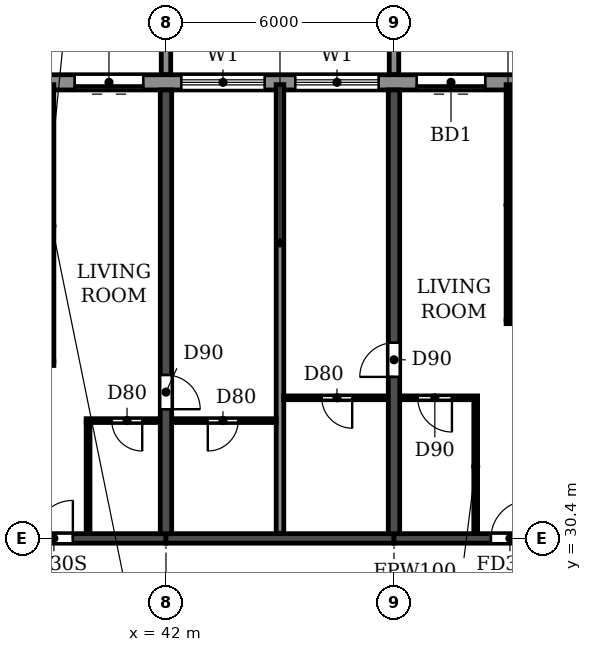
"""IFC4 building model, lengths in metres.
Left out: names, types, materials, properties, quantities, classifications, styles, units other than length and angle.
Written with IfcOpenShell. Run it as: python <this file> out.ifc"""

import sys

from ifc_helpers import new_model, si_unit, direction, frame, frame_2d, origin, place, context, subcontext, project, spatial, polyline, rectangle, outline, extrude, source, transform, mapped, element, fill, save


model = new_model("IFC4")
c1 = context("Model", 3, precision=1e-05, world=origin(), true_north=direction((0.0, 1.0)))
c2 = subcontext(c1, "Body", "Model", "MODEL_VIEW")
j1 = project(units=[si_unit("LENGTHUNIT", "METRE"), si_unit("PLANEANGLEUNIT", "RADIAN")], contexts=[c1])
p1 = place(None, origin())
s1 = spatial("IfcSite", under=j1, at=p1, CompositionType="ELEMENT")
p2 = place(p1, origin())
s2 = spatial("IfcBuilding", under=s1, at=p2, CompositionType="ELEMENT")
p3 = place(p2, frame((0.0, 0.0, 122.4)))
s3 = spatial("IfcBuildingStorey", under=s2, at=p3, CompositionType="ELEMENT", Elevation=122.4)
p4 = place(p3, frame((42.0, 30.525, 0.0), z_axis=(0.0, 0.0, 1.0), x_axis=(0.0, 1.0, 0.0)))
e1 = element("IfcWall", 1, at=p4, inside=s3, PredefinedType="SHEAR", context=c2, shape_type="SweptSolid", body=[
    extrude(rectangle(XDim=11.675, YDim=0.3, at=frame_2d((5.837, 0.0))), origin(), (0.0, 0.0, 1.0), 3.07),
])
p5 = place(p4, frame((3.275, 0.0, 0.0)))
e2 = element("IfcOpeningElement", 2, at=p5, cuts=e1, PredefinedType="OPENING", context=c2, shape_type="SweptSolid", body=[
    extrude(rectangle(XDim=0.9, YDim=2.1, at=frame_2d((0.45, 1.05))), frame((0.0, 0.16, 0.0), z_axis=(0.0, -1.0, 0.0), x_axis=(1.0, 0.0, 0.0)), (0.0, 0.0, 1.0), 0.32),
])
p6 = place(p3, frame((48.0, 30.525, 0.0), z_axis=(0.0, 0.0, 1.0), x_axis=(0.0, 1.0, 0.0)))
e3 = element("IfcWall", 3, at=p6, inside=s3, PredefinedType="SHEAR", context=c2, shape_type="SweptSolid", body=[
    extrude(rectangle(XDim=11.675, YDim=0.3, at=frame_2d((5.837, 0.0))), origin(), (0.0, 0.0, 1.0), 3.07),
])
p7 = place(p6, frame((4.125, 0.0, 0.0)))
e4 = element("IfcOpeningElement", 4, at=p7, cuts=e3, PredefinedType="OPENING", context=c2, shape_type="SweptSolid", body=[
    extrude(rectangle(XDim=0.9, YDim=2.1, at=frame_2d((0.45, 1.05))), frame((0.0, 0.16, 0.0), z_axis=(0.0, -1.0, 0.0), x_axis=(1.0, 0.0, 0.0)), (0.0, 0.0, 1.0), 0.32),
])
p8 = place(p3, frame((36.0, 30.4, 0.0), z_axis=(0.0, 0.0, 1.0), x_axis=(1.0, 0.0, 0.0)))
e5 = element("IfcWall", 5, at=p8, inside=s3, PredefinedType="SHEAR", context=c2, shape_type="SweptSolid", body=[
    extrude(rectangle(XDim=6.0, YDim=0.25, at=frame_2d((3.0, 0.0))), origin(), (0.0, 0.0, 1.0), 2.47),
])
p9 = place(p8, frame((2.55, 0.0, 0.0)))
e6 = element("IfcOpeningElement", 6, at=p9, cuts=e5, PredefinedType="OPENING", context=c2, shape_type="SweptSolid", body=[
    extrude(rectangle(XDim=1.0, YDim=2.1, at=frame_2d((0.5, 1.05))), frame((0.0, 0.135, 0.0), z_axis=(0.0, -1.0, 0.0), x_axis=(1.0, 0.0, 0.0)), (0.0, 0.0, 1.0), 0.27),
])
p10 = place(p3, frame((42.0, 30.4, 0.0), z_axis=(0.0, 0.0, 1.0), x_axis=(1.0, 0.0, 0.0)))
e7 = element("IfcWall", 7, at=p10, inside=s3, PredefinedType="SHEAR", context=c2, shape_type="SweptSolid", body=[
    extrude(rectangle(XDim=6.0, YDim=0.25, at=frame_2d((3.0, 0.0))), origin(), (0.0, 0.0, 1.0), 2.47),
])
p11 = place(p3, frame((48.0, 30.4, 0.0), z_axis=(0.0, 0.0, 1.0), x_axis=(1.0, 0.0, 0.0)))
e8 = element("IfcWall", 8, at=p11, inside=s3, PredefinedType="SHEAR", context=c2, shape_type="SweptSolid", body=[
    extrude(rectangle(XDim=6.0, YDim=0.25, at=frame_2d((3.0, 0.0))), origin(), (0.0, 0.0, 1.0), 2.47),
])
p12 = place(p11, frame((2.55, 0.0, 0.0)))
e9 = element("IfcOpeningElement", 9, at=p12, cuts=e8, PredefinedType="OPENING", context=c2, shape_type="SweptSolid", body=[
    extrude(rectangle(XDim=1.0, YDim=2.1, at=frame_2d((0.5, 1.05))), frame((0.0, 0.135, 0.0), z_axis=(0.0, -1.0, 0.0), x_axis=(1.0, 0.0, 0.0)), (0.0, 0.0, 1.0), 0.27),
])
p13 = place(p3, frame((85.317, 42.4, 0.0), z_axis=(0.0, 0.0, 1.0), x_axis=(-1.0, 0.0, 0.0)))
e10 = element("IfcWall", 10, at=p13, inside=s3, PredefinedType="STANDARD", context=c2, shape_type="SweptSolid", body=[
    extrude(rectangle(XDim=68.634, YDim=0.4, at=frame_2d((34.317, 0.0))), origin(), (0.0, 0.0, 1.0), 3.07),
])
p14 = place(p13, frame((64.717, 0.0, 0.9)))
e11 = element("IfcOpeningElement", 11, at=p14, cuts=e10, PredefinedType="OPENING", context=c2, shape_type="SweptSolid", body=[
    extrude(rectangle(XDim=2.2, YDim=1.5, at=frame_2d((1.1, 0.75))), frame((0.0, 0.21, 0.0), z_axis=(0.0, -1.0, 0.0), x_axis=(1.0, 0.0, 0.0)), (0.0, 0.0, 1.0), 0.42),
])
p15 = place(p13, frame((61.917, 0.0, 0.0)))
e12 = element("IfcOpeningElement", 12, at=p15, cuts=e10, PredefinedType="OPENING", context=c2, shape_type="SweptSolid", body=[
    extrude(rectangle(XDim=1.8, YDim=2.4, at=frame_2d((0.9, 1.2))), frame((0.0, 0.21, 0.0), z_axis=(0.0, -1.0, 0.0), x_axis=(1.0, 0.0, 0.0)), (0.0, 0.0, 1.0), 0.42),
])
p16 = place(p13, frame((58.717, 0.0, 0.9)))
e13 = element("IfcOpeningElement", 13, at=p16, cuts=e10, PredefinedType="OPENING", context=c2, shape_type="SweptSolid", body=[
    extrude(rectangle(XDim=2.2, YDim=1.5, at=frame_2d((1.1, 0.75))), frame((0.0, 0.21, 0.0), z_axis=(0.0, -1.0, 0.0), x_axis=(1.0, 0.0, 0.0)), (0.0, 0.0, 1.0), 0.42),
])
p17 = place(p13, frame((55.917, 0.0, 0.0)))
e14 = element("IfcOpeningElement", 14, at=p17, cuts=e10, PredefinedType="OPENING", context=c2, shape_type="SweptSolid", body=[
    extrude(rectangle(XDim=1.8, YDim=2.4, at=frame_2d((0.9, 1.2))), frame((0.0, 0.21, 0.0), z_axis=(0.0, -1.0, 0.0), x_axis=(1.0, 0.0, 0.0)), (0.0, 0.0, 1.0), 0.42),
])
p18 = place(p13, frame((52.717, 0.0, 0.9)))
e15 = element("IfcOpeningElement", 15, at=p18, cuts=e10, PredefinedType="OPENING", context=c2, shape_type="SweptSolid", body=[
    extrude(rectangle(XDim=2.2, YDim=1.5, at=frame_2d((1.1, 0.75))), frame((0.0, 0.21, 0.0), z_axis=(0.0, -1.0, 0.0), x_axis=(1.0, 0.0, 0.0)), (0.0, 0.0, 1.0), 0.42),
])
p19 = place(p13, frame((49.917, 0.0, 0.0)))
e16 = element("IfcOpeningElement", 16, at=p19, cuts=e10, PredefinedType="OPENING", context=c2, shape_type="SweptSolid", body=[
    extrude(rectangle(XDim=1.8, YDim=2.4, at=frame_2d((0.9, 1.2))), frame((0.0, 0.21, 0.0), z_axis=(0.0, -1.0, 0.0), x_axis=(1.0, 0.0, 0.0)), (0.0, 0.0, 1.0), 0.42),
])
p20 = place(p13, frame((46.717, 0.0, 0.9)))
e17 = element("IfcOpeningElement", 17, at=p20, cuts=e10, PredefinedType="OPENING", context=c2, shape_type="SweptSolid", body=[
    extrude(rectangle(XDim=2.2, YDim=1.5, at=frame_2d((1.1, 0.75))), frame((0.0, 0.21, 0.0), z_axis=(0.0, -1.0, 0.0), x_axis=(1.0, 0.0, 0.0)), (0.0, 0.0, 1.0), 0.42),
])
p21 = place(p13, frame((43.917, 0.0, 0.0)))
e18 = element("IfcOpeningElement", 18, at=p21, cuts=e10, PredefinedType="OPENING", context=c2, shape_type="SweptSolid", body=[
    extrude(rectangle(XDim=1.8, YDim=2.4, at=frame_2d((0.9, 1.2))), frame((0.0, 0.21, 0.0), z_axis=(0.0, -1.0, 0.0), x_axis=(1.0, 0.0, 0.0)), (0.0, 0.0, 1.0), 0.42),
])
p22 = place(p13, frame((40.717, 0.0, 0.9)))
e19 = element("IfcOpeningElement", 19, at=p22, cuts=e10, PredefinedType="OPENING", context=c2, shape_type="SweptSolid", body=[
    extrude(rectangle(XDim=2.2, YDim=1.5, at=frame_2d((1.1, 0.75))), frame((0.0, 0.21, 0.0), z_axis=(0.0, -1.0, 0.0), x_axis=(1.0, 0.0, 0.0)), (0.0, 0.0, 1.0), 0.42),
])
p23 = place(p13, frame((37.717, 0.0, 0.9)))
e20 = element("IfcOpeningElement", 20, at=p23, cuts=e10, PredefinedType="OPENING", context=c2, shape_type="SweptSolid", body=[
    extrude(rectangle(XDim=2.2, YDim=1.5, at=frame_2d((1.1, 0.75))), frame((0.0, 0.21, 0.0), z_axis=(0.0, -1.0, 0.0), x_axis=(1.0, 0.0, 0.0)), (0.0, 0.0, 1.0), 0.42),
])
p24 = place(p13, frame((34.917, 0.0, 0.0)))
e21 = element("IfcOpeningElement", 21, at=p24, cuts=e10, PredefinedType="OPENING", context=c2, shape_type="SweptSolid", body=[
    extrude(rectangle(XDim=1.8, YDim=2.4, at=frame_2d((0.9, 1.2))), frame((0.0, 0.21, 0.0), z_axis=(0.0, -1.0, 0.0), x_axis=(1.0, 0.0, 0.0)), (0.0, 0.0, 1.0), 0.42),
])
p25 = place(p13, frame((31.717, 0.0, 0.9)))
e22 = element("IfcOpeningElement", 22, at=p25, cuts=e10, PredefinedType="OPENING", context=c2, shape_type="SweptSolid", body=[
    extrude(rectangle(XDim=2.2, YDim=1.5, at=frame_2d((1.1, 0.75))), frame((0.0, 0.21, 0.0), z_axis=(0.0, -1.0, 0.0), x_axis=(1.0, 0.0, 0.0)), (0.0, 0.0, 1.0), 0.42),
])
p26 = place(p13, frame((28.717, 0.0, 0.9)))
e23 = element("IfcOpeningElement", 23, at=p26, cuts=e10, PredefinedType="OPENING", context=c2, shape_type="SweptSolid", body=[
    extrude(rectangle(XDim=2.2, YDim=1.5, at=frame_2d((1.1, 0.75))), frame((0.0, 0.21, 0.0), z_axis=(0.0, -1.0, 0.0), x_axis=(1.0, 0.0, 0.0)), (0.0, 0.0, 1.0), 0.42),
])
p27 = place(p13, frame((25.717, 0.0, 0.9)))
e24 = element("IfcOpeningElement", 24, at=p27, cuts=e10, PredefinedType="OPENING", context=c2, shape_type="SweptSolid", body=[
    extrude(rectangle(XDim=2.2, YDim=1.5, at=frame_2d((1.1, 0.75))), frame((0.0, 0.21, 0.0), z_axis=(0.0, -1.0, 0.0), x_axis=(1.0, 0.0, 0.0)), (0.0, 0.0, 1.0), 0.42),
])
p28 = place(p13, frame((22.717, 0.0, 0.9)))
e25 = element("IfcOpeningElement", 25, at=p28, cuts=e10, PredefinedType="OPENING", context=c2, shape_type="SweptSolid", body=[
    extrude(rectangle(XDim=2.2, YDim=1.5, at=frame_2d((1.1, 0.75))), frame((0.0, 0.21, 0.0), z_axis=(0.0, -1.0, 0.0), x_axis=(1.0, 0.0, 0.0)), (0.0, 0.0, 1.0), 0.42),
])
p29 = place(p13, frame((19.917, 0.0, 0.0)))
e26 = element("IfcOpeningElement", 26, at=p29, cuts=e10, PredefinedType="OPENING", context=c2, shape_type="SweptSolid", body=[
    extrude(rectangle(XDim=1.8, YDim=2.4, at=frame_2d((0.9, 1.2))), frame((0.0, 0.21, 0.0), z_axis=(0.0, -1.0, 0.0), x_axis=(1.0, 0.0, 0.0)), (0.0, 0.0, 1.0), 0.42),
])
p30 = place(p13, frame((16.917, 0.0, 0.0)))
e27 = element("IfcOpeningElement", 27, at=p30, cuts=e10, PredefinedType="OPENING", context=c2, shape_type="SweptSolid", body=[
    extrude(rectangle(XDim=1.8, YDim=2.4, at=frame_2d((0.9, 1.2))), frame((0.0, 0.21, 0.0), z_axis=(0.0, -1.0, 0.0), x_axis=(1.0, 0.0, 0.0)), (0.0, 0.0, 1.0), 0.42),
])
p31 = place(p13, frame((13.717, 0.0, 0.9)))
e28 = element("IfcOpeningElement", 28, at=p31, cuts=e10, PredefinedType="OPENING", context=c2, shape_type="SweptSolid", body=[
    extrude(rectangle(XDim=2.2, YDim=1.5, at=frame_2d((1.1, 0.75))), frame((0.0, 0.21, 0.0), z_axis=(0.0, -1.0, 0.0), x_axis=(1.0, 0.0, 0.0)), (0.0, 0.0, 1.0), 0.42),
])
p32 = place(p13, frame((10.717, 0.0, 0.9)))
e29 = element("IfcOpeningElement", 29, at=p32, cuts=e10, PredefinedType="OPENING", context=c2, shape_type="SweptSolid", body=[
    extrude(rectangle(XDim=2.2, YDim=1.5, at=frame_2d((1.1, 0.75))), frame((0.0, 0.21, 0.0), z_axis=(0.0, -1.0, 0.0), x_axis=(1.0, 0.0, 0.0)), (0.0, 0.0, 1.0), 0.42),
])
p33 = place(p13, frame((7.717, 0.0, 0.9)))
e30 = element("IfcOpeningElement", 30, at=p33, cuts=e10, PredefinedType="OPENING", context=c2, shape_type="SweptSolid", body=[
    extrude(rectangle(XDim=2.2, YDim=1.5, at=frame_2d((1.1, 0.75))), frame((0.0, 0.21, 0.0), z_axis=(0.0, -1.0, 0.0), x_axis=(1.0, 0.0, 0.0)), (0.0, 0.0, 1.0), 0.42),
])
p34 = place(p13, frame((4.917, 0.0, 0.0)))
e31 = element("IfcOpeningElement", 31, at=p34, cuts=e10, PredefinedType="OPENING", context=c2, shape_type="SweptSolid", body=[
    extrude(rectangle(XDim=1.8, YDim=2.4, at=frame_2d((0.9, 1.2))), frame((0.0, 0.21, 0.0), z_axis=(0.0, -1.0, 0.0), x_axis=(1.0, 0.0, 0.0)), (0.0, 0.0, 1.0), 0.42),
])
p35 = place(p13, frame((1.717, 0.0, 0.9)))
e32 = element("IfcOpeningElement", 32, at=p35, cuts=e10, PredefinedType="OPENING", context=c2, shape_type="SweptSolid", body=[
    extrude(rectangle(XDim=2.2, YDim=1.5, at=frame_2d((1.1, 0.75))), frame((0.0, 0.21, 0.0), z_axis=(0.0, -1.0, 0.0), x_axis=(1.0, 0.0, 0.0)), (0.0, 0.0, 1.0), 0.42),
])
m1 = source(origin(), c2, "Body", "SweptSolid", [
    extrude(outline(polyline([(0.0, 0.0), (0.25, 0.0), (0.25, 3.1), (0.0, 3.1), (0.0, 0.0)])), origin(), (0.0, 0.0, 1.0), 3.1),
])
for number, where in (
    (33, (41.875, 42.6, 0.0)),
    (34, (47.875, 42.6, 0.0)),
):
    element("IfcWall", number, at=place(p3, frame(where)), inside=s3, PredefinedType="STANDARD", context=c2, shape_type="MappedRepresentation", body=[
        mapped(m1, transform((0.0, 0.0, 0.0))),
    ])
p36 = place(p3, frame((45.0, 30.535, 0.0), z_axis=(0.0, 0.0, 1.0), x_axis=(0.0, 1.0, 0.0)))
e35 = element("IfcWall", 35, at=p36, inside=s3, PredefinedType="PARTITIONING", context=c2, shape_type="SweptSolid", body=[
    extrude(rectangle(XDim=11.805, YDim=0.2, at=frame_2d((5.903, 0.0))), origin(), (0.0, 0.0, 1.0), 3.07),
])
p37 = place(p3, frame((39.9, 33.5, 0.0), z_axis=(0.0, 0.0, 1.0), x_axis=(1.0, 0.0, 0.0)))
e36 = element("IfcWall", 36, at=p37, inside=s3, PredefinedType="PARTITIONING", context=c2, shape_type="SweptSolid", body=[
    extrude(rectangle(XDim=1.94, YDim=0.1, at=frame_2d((0.97, 0.0))), origin(), (0.0, 0.0, 1.0), 3.07),
])
p38 = place(p37, frame((0.675, 0.0, 0.0)))
e37 = element("IfcOpeningElement", 37, at=p38, cuts=e36, PredefinedType="OPENING", context=c2, shape_type="SweptSolid", body=[
    extrude(rectangle(XDim=0.8, YDim=2.1, at=frame_2d((0.4, 1.05))), frame((0.0, 0.06, 0.0), z_axis=(0.0, -1.0, 0.0), x_axis=(1.0, 0.0, 0.0)), (0.0, 0.0, 1.0), 0.12),
])
p39 = place(p3, frame((42.16, 33.5, 0.0), z_axis=(0.0, 0.0, 1.0), x_axis=(1.0, 0.0, 0.0)))
e38 = element("IfcWall", 38, at=p39, inside=s3, PredefinedType="PARTITIONING", context=c2, shape_type="SweptSolid", body=[
    extrude(rectangle(XDim=2.74, YDim=0.1, at=frame_2d((1.37, 0.0))), origin(), (0.0, 0.0, 1.0), 3.07),
])
p40 = place(p39, frame((0.94, 0.0, 0.0)))
e39 = element("IfcOpeningElement", 39, at=p40, cuts=e38, PredefinedType="OPENING", context=c2, shape_type="SweptSolid", body=[
    extrude(rectangle(XDim=0.8, YDim=2.1, at=frame_2d((0.4, 1.05))), frame((0.0, 0.06, 0.0), z_axis=(0.0, -1.0, 0.0), x_axis=(1.0, 0.0, 0.0)), (0.0, 0.0, 1.0), 0.12),
])
p41 = place(p3, frame((45.1, 34.1, 0.0), z_axis=(0.0, 0.0, 1.0), x_axis=(1.0, 0.0, 0.0)))
e40 = element("IfcWall", 40, at=p41, inside=s3, PredefinedType="PARTITIONING", context=c2, shape_type="SweptSolid", body=[
    extrude(rectangle(XDim=2.74, YDim=0.1, at=frame_2d((1.37, 0.0))), origin(), (0.0, 0.0, 1.0), 3.07),
])
p42 = place(p41, frame((1.0, 0.0, 0.0)))
e41 = element("IfcOpeningElement", 41, at=p42, cuts=e40, PredefinedType="OPENING", context=c2, shape_type="SweptSolid", body=[
    extrude(rectangle(XDim=0.8, YDim=2.1, at=frame_2d((0.4, 1.05))), frame((0.0, 0.06, 0.0), z_axis=(0.0, -1.0, 0.0), x_axis=(1.0, 0.0, 0.0)), (0.0, 0.0, 1.0), 0.12),
])
p43 = place(p3, frame((48.16, 34.1, 0.0), z_axis=(0.0, 0.0, 1.0), x_axis=(1.0, 0.0, 0.0)))
e42 = element("IfcWall", 42, at=p43, inside=s3, PredefinedType="PARTITIONING", context=c2, shape_type="SweptSolid", body=[
    extrude(rectangle(XDim=2.04, YDim=0.1, at=frame_2d((1.02, 0.0))), origin(), (0.0, 0.0, 1.0), 3.07),
])
p44 = place(p43, frame((0.465, 0.0, 0.0)))
e43 = element("IfcOpeningElement", 43, at=p44, cuts=e42, PredefinedType="OPENING", context=c2, shape_type="SweptSolid", body=[
    extrude(rectangle(XDim=0.9, YDim=2.1, at=frame_2d((0.45, 1.05))), frame((0.0, 0.06, 0.0), z_axis=(0.0, -1.0, 0.0), x_axis=(1.0, 0.0, 0.0)), (0.0, 0.0, 1.0), 0.12),
])
p45 = place(p3, frame((36.16, 35.0, 0.0), z_axis=(0.0, 0.0, 1.0), x_axis=(1.0, 0.0, 0.0)))
e44 = element("IfcWall", 44, at=p45, inside=s3, PredefinedType="PARTITIONING", context=c2, shape_type="SweptSolid", body=[
    extrude(rectangle(XDim=2.89, YDim=0.1, at=frame_2d((1.445, 0.0))), origin(), (0.0, 0.0, 1.0), 3.07),
])
p46 = place(p45, frame((0.34, 0.0, 0.0)))
e45 = element("IfcOpeningElement", 45, at=p46, cuts=e44, PredefinedType="OPENING", context=c2, shape_type="SweptSolid", body=[
    extrude(rectangle(XDim=0.9, YDim=2.1, at=frame_2d((0.45, 1.05))), frame((0.0, 0.06, 0.0), z_axis=(0.0, -1.0, 0.0), x_axis=(1.0, 0.0, 0.0)), (0.0, 0.0, 1.0), 0.12),
])
p47 = place(p3, frame((50.95, 36.1, 0.0), z_axis=(0.0, 0.0, 1.0), x_axis=(1.0, 0.0, 0.0)))
e46 = element("IfcWall", 46, at=p47, inside=s3, PredefinedType="PARTITIONING", context=c2, shape_type="SweptSolid", body=[
    extrude(rectangle(XDim=2.89, YDim=0.1, at=frame_2d((1.445, 0.0))), origin(), (0.0, 0.0, 1.0), 3.07),
])
p48 = place(p47, frame((0.55, 0.0, 0.0)))
e47 = element("IfcOpeningElement", 47, at=p48, cuts=e46, PredefinedType="OPENING", context=c2, shape_type="SweptSolid", body=[
    extrude(rectangle(XDim=0.9, YDim=2.1, at=frame_2d((0.45, 1.05))), frame((0.0, 0.06, 0.0), z_axis=(0.0, -1.0, 0.0), x_axis=(1.0, 0.0, 0.0)), (0.0, 0.0, 1.0), 0.12),
])
p49 = place(p3, frame((39.0, 35.05, 0.0), z_axis=(0.0, 0.0, 1.0), x_axis=(0.0, 1.0, 0.0)))
e48 = element("IfcWall", 48, at=p49, inside=s3, PredefinedType="PARTITIONING", context=c2, shape_type="SweptSolid", body=[
    extrude(rectangle(XDim=7.29, YDim=0.1, at=frame_2d((3.645, 0.0))), origin(), (0.0, 0.0, 1.0), 3.07),
])
p50 = place(p3, frame((39.95, 30.535, 0.0), z_axis=(0.0, 0.0, 1.0), x_axis=(0.0, 1.0, 0.0)))
e49 = element("IfcWall", 49, at=p50, inside=s3, PredefinedType="PARTITIONING", context=c2, shape_type="SweptSolid", body=[
    extrude(rectangle(XDim=2.915, YDim=0.1, at=frame_2d((1.458, 0.0))), origin(), (0.0, 0.0, 1.0), 3.07),
])
p51 = place(p3, frame((50.15, 30.535, 0.0), z_axis=(0.0, 0.0, 1.0), x_axis=(0.0, 1.0, 0.0)))
e50 = element("IfcWall", 50, at=p51, inside=s3, PredefinedType="PARTITIONING", context=c2, shape_type="SweptSolid", body=[
    extrude(rectangle(XDim=3.515, YDim=0.1, at=frame_2d((1.758, 0.0))), origin(), (0.0, 0.0, 1.0), 3.07),
])
p52 = place(p3, frame((51.0, 36.15, 0.0), z_axis=(0.0, 0.0, 1.0), x_axis=(0.0, 1.0, 0.0)))
e51 = element("IfcWall", 51, at=p52, inside=s3, PredefinedType="PARTITIONING", context=c2, shape_type="SweptSolid", body=[
    extrude(rectangle(XDim=6.19, YDim=0.1, at=frame_2d((3.095, 0.0))), origin(), (0.0, 0.0, 1.0), 3.07),
])
p53 = place(p21, origin())
e52 = element("IfcDoor", 52, at=p53, inside=s3, OperationType="DOUBLE_DOOR_SLIDING", PredefinedType="DOOR", context=c2, shape_type="SweptSolid", body=[
    extrude(rectangle(XDim=1.8, YDim=2.4, at=frame_2d((0.9, 1.2))), frame((0.0, 0.025, 0.0), z_axis=(0.0, -1.0, 0.0), x_axis=(1.0, 0.0, 0.0)), (0.0, 0.0, 1.0), 0.05),
])
fill(e18, e52)
p54 = place(p22, origin())
e53 = element("IfcWindow", 53, at=p54, inside=s3, PartitioningType="DOUBLE_PANEL_HORIZONTAL", PredefinedType="WINDOW", context=c2, shape_type="SweptSolid", body=[
    extrude(rectangle(XDim=2.2, YDim=1.5, at=frame_2d((1.1, 0.75))), frame((0.0, 0.03, 0.0), z_axis=(0.0, -1.0, 0.0), x_axis=(1.0, 0.0, 0.0)), (0.0, 0.0, 1.0), 0.06),
])
fill(e19, e53)
p55 = place(p23, origin())
e54 = element("IfcWindow", 54, at=p55, inside=s3, PartitioningType="DOUBLE_PANEL_HORIZONTAL", PredefinedType="WINDOW", context=c2, shape_type="SweptSolid", body=[
    extrude(rectangle(XDim=2.2, YDim=1.5, at=frame_2d((1.1, 0.75))), frame((0.0, 0.03, 0.0), z_axis=(0.0, -1.0, 0.0), x_axis=(1.0, 0.0, 0.0)), (0.0, 0.0, 1.0), 0.06),
])
fill(e20, e54)
p56 = place(p24, origin())
e55 = element("IfcDoor", 55, at=p56, inside=s3, OperationType="DOUBLE_DOOR_SLIDING", PredefinedType="DOOR", context=c2, shape_type="SweptSolid", body=[
    extrude(rectangle(XDim=1.8, YDim=2.4, at=frame_2d((0.9, 1.2))), frame((0.0, 0.025, 0.0), z_axis=(0.0, -1.0, 0.0), x_axis=(1.0, 0.0, 0.0)), (0.0, 0.0, 1.0), 0.05),
])
fill(e21, e55)
p57 = place(p40, frame((0.8, 0.0, 0.0), z_axis=(0.0, 0.0, 1.0), x_axis=(-1.0, 0.0, 0.0)))
e56 = element("IfcDoor", 56, at=p57, inside=s3, OperationType="SINGLE_SWING_RIGHT", PredefinedType="DOOR", context=c2, shape_type="SweptSolid", body=[
    extrude(rectangle(XDim=0.8, YDim=2.1, at=frame_2d((0.4, 1.05))), frame((0.0, 0.025, 0.0), z_axis=(0.0, -1.0, 0.0), x_axis=(1.0, 0.0, 0.0)), (0.0, 0.0, 1.0), 0.05),
])
fill(e39, e56)
p58 = place(p9, origin())
e57 = element("IfcDoor", 57, at=p58, inside=s3, OperationType="SINGLE_SWING_RIGHT", PredefinedType="DOOR", context=c2, shape_type="SweptSolid", body=[
    extrude(rectangle(XDim=1.0, YDim=2.1, at=frame_2d((0.5, 1.05))), frame((0.0, 0.025, 0.0), z_axis=(0.0, -1.0, 0.0), x_axis=(1.0, 0.0, 0.0)), (0.0, 0.0, 1.0), 0.05),
])
fill(e6, e57)
p59 = place(p38, frame((0.8, 0.0, 0.0), z_axis=(0.0, 0.0, 1.0), x_axis=(-1.0, 0.0, 0.0)))
e58 = element("IfcDoor", 58, at=p59, inside=s3, OperationType="SINGLE_SWING_LEFT", PredefinedType="DOOR", context=c2, shape_type="SweptSolid", body=[
    extrude(rectangle(XDim=0.8, YDim=2.1, at=frame_2d((0.4, 1.05))), frame((0.0, 0.025, 0.0), z_axis=(0.0, -1.0, 0.0), x_axis=(1.0, 0.0, 0.0)), (0.0, 0.0, 1.0), 0.05),
])
fill(e37, e58)
p60 = place(p5, frame((0.9, 0.0, 0.0), z_axis=(0.0, 0.0, 1.0), x_axis=(-1.0, 0.0, 0.0)))
e59 = element("IfcDoor", 59, at=p60, inside=s3, OperationType="SINGLE_SWING_RIGHT", PredefinedType="DOOR", context=c2, shape_type="SweptSolid", body=[
    extrude(rectangle(XDim=0.9, YDim=2.1, at=frame_2d((0.45, 1.05))), frame((0.0, 0.025, 0.0), z_axis=(0.0, -1.0, 0.0), x_axis=(1.0, 0.0, 0.0)), (0.0, 0.0, 1.0), 0.05),
])
fill(e2, e59)
p61 = place(p42, frame((0.8, 0.0, 0.0), z_axis=(0.0, 0.0, 1.0), x_axis=(-1.0, 0.0, 0.0)))
e60 = element("IfcDoor", 60, at=p61, inside=s3, OperationType="SINGLE_SWING_LEFT", PredefinedType="DOOR", context=c2, shape_type="SweptSolid", body=[
    extrude(rectangle(XDim=0.8, YDim=2.1, at=frame_2d((0.4, 1.05))), frame((0.0, 0.025, 0.0), z_axis=(0.0, -1.0, 0.0), x_axis=(1.0, 0.0, 0.0)), (0.0, 0.0, 1.0), 0.05),
])
fill(e41, e60)
p62 = place(p7, origin())
e61 = element("IfcDoor", 61, at=p62, inside=s3, OperationType="SINGLE_SWING_LEFT", PredefinedType="DOOR", context=c2, shape_type="SweptSolid", body=[
    extrude(rectangle(XDim=0.9, YDim=2.1, at=frame_2d((0.45, 1.05))), frame((0.0, 0.025, 0.0), z_axis=(0.0, -1.0, 0.0), x_axis=(1.0, 0.0, 0.0)), (0.0, 0.0, 1.0), 0.05),
])
fill(e4, e61)
p63 = place(p44, frame((0.9, 0.0, 0.0), z_axis=(0.0, 0.0, 1.0), x_axis=(-1.0, 0.0, 0.0)))
e62 = element("IfcDoor", 62, at=p63, inside=s3, OperationType="SINGLE_SWING_LEFT", PredefinedType="DOOR", context=c2, shape_type="SweptSolid", body=[
    extrude(rectangle(XDim=0.9, YDim=2.1, at=frame_2d((0.45, 1.05))), frame((0.0, 0.025, 0.0), z_axis=(0.0, -1.0, 0.0), x_axis=(1.0, 0.0, 0.0)), (0.0, 0.0, 1.0), 0.05),
])
fill(e43, e62)
p64 = place(p12, origin())
e63 = element("IfcDoor", 63, at=p64, inside=s3, OperationType="SINGLE_SWING_RIGHT", PredefinedType="DOOR", context=c2, shape_type="SweptSolid", body=[
    extrude(rectangle(XDim=1.0, YDim=2.1, at=frame_2d((0.5, 1.05))), frame((0.0, 0.025, 0.0), z_axis=(0.0, -1.0, 0.0), x_axis=(1.0, 0.0, 0.0)), (0.0, 0.0, 1.0), 0.05),
])
fill(e9, e63)
save(model, sys.argv[1])
